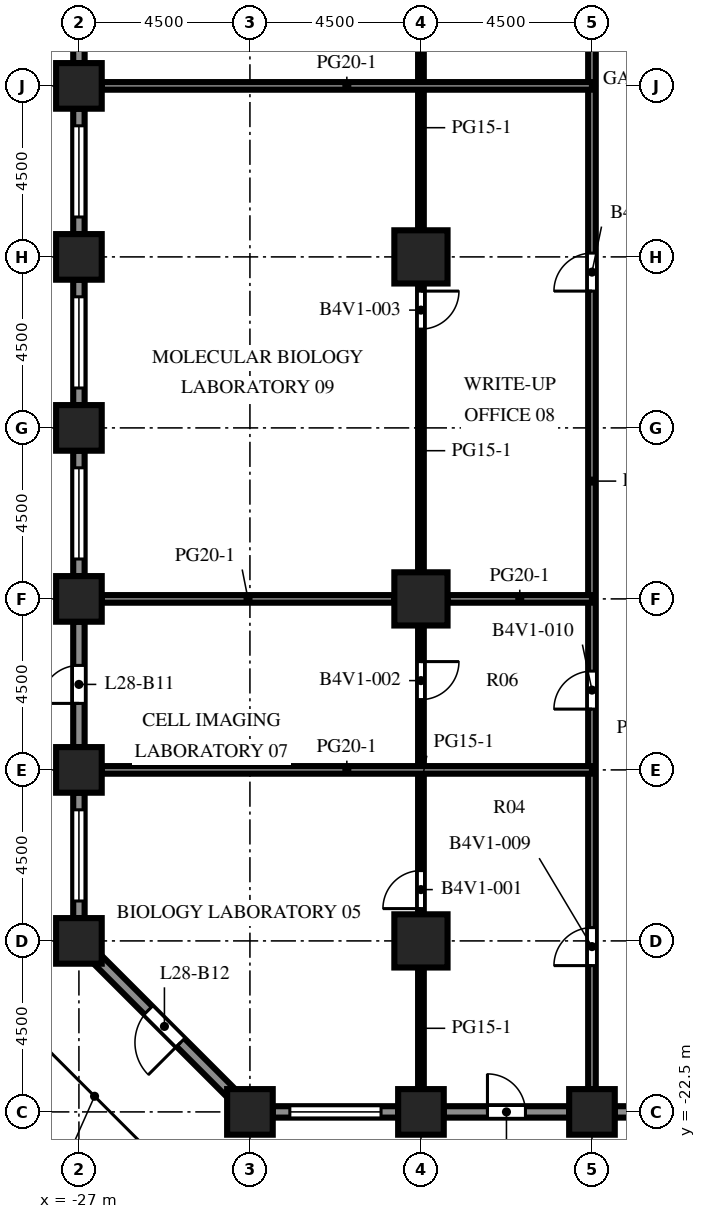
"""IFC4 building model, lengths in metres.
Left out: names, types, materials, properties, quantities, classifications, styles, units other than length and angle.
Written with IfcOpenShell. Run it as: python <this file> out.ifc"""

import sys

from ifc_helpers import new_model, si_unit, direction, frame, frame_2d, origin, origin_2d, place, context, subcontext, project, spatial, rectangle, extrude, element, fill, save


model = new_model("IFC4")
c1 = context("Model", 3, precision=1e-05, world=origin(), true_north=direction((0.0, 1.0)))
c2 = subcontext(c1, "Body", "Model", "MODEL_VIEW")
j1 = project(units=[si_unit("LENGTHUNIT", "METRE"), si_unit("PLANEANGLEUNIT", "RADIAN")], contexts=[c1])
p1 = place(None, origin())
s1 = spatial("IfcSite", under=j1, at=p1, CompositionType="ELEMENT")
p2 = place(p1, origin())
s2 = spatial("IfcBuilding", under=s1, at=p2, CompositionType="ELEMENT")
p3 = place(p2, frame((0.0, 0.0, 124.9)))
s3 = spatial("IfcBuildingStorey", under=s2, at=p3, CompositionType="ELEMENT", Elevation=124.9)
for number, where, z_axis, x_axis in (
    (1, (-27.0, -18.0, 0.0), (0.0, 0.0, 1.0), (1.0, 0.0, 0.0)),
    (2, (-27.0, -13.5, 0.0), (0.0, 0.0, 1.0), (1.0, 0.0, 0.0)),
    (3, (-27.0, -9.0, 0.0), (0.0, 0.0, 1.0), (1.0, 0.0, 0.0)),
    (4, (-27.0, -4.5, 0.0), (0.0, 0.0, 1.0), (1.0, 0.0, 0.0)),
    (5, (-27.0, 0.0, 0.0), (0.0, 0.0, 1.0), (1.0, 0.0, 0.0)),
    (6, (-27.0, 4.5, 0.0), (0.0, 0.0, 1.0), (1.0, 0.0, 0.0)),
    (7, (-22.5, -22.5, 0.0), (0.0, 0.0, 1.0), (1.0, 0.0, 0.0)),
    (8, (-18.0, -22.5, 0.0), (0.0, 0.0, 1.0), (1.0, 0.0, 0.0)),
    (9, (-13.5, -22.5, 0.0), (0.0, 0.0, 1.0), (1.0, 0.0, 0.0)),
):
    element("IfcColumn", number, at=place(p3, frame(where, z_axis=z_axis, x_axis=x_axis)), inside=s3, PredefinedType="COLUMN", context=c2, shape_type="SweptSolid", body=[
        extrude(rectangle(XDim=1.2, YDim=1.2, at=origin_2d()), origin(), (0.0, 0.0, 1.0), 4.1),
    ])
for number, where, z_axis, x_axis in (
    (10, (-18.0, -18.0, 0.0), (0.0, 0.0, 1.0), (1.0, 0.0, 0.0)),
    (11, (-18.0, -9.0, 0.0), (0.0, 0.0, 1.0), (1.0, 0.0, 0.0)),
    (12, (-18.0, 0.0, 0.0), (0.0, 0.0, 1.0), (1.0, 0.0, 0.0)),
):
    element("IfcColumn", number, at=place(p3, frame(where, z_axis=z_axis, x_axis=x_axis)), inside=s3, PredefinedType="COLUMN", context=c2, shape_type="SweptSolid", body=[
        extrude(rectangle(XDim=1.4, YDim=1.4, at=origin_2d()), origin(), (0.0, 0.0, 1.0), 4.1),
    ])
p4 = place(p3, frame((-18.6, -22.5, 0.0), z_axis=(0.0, 0.0, 1.0), x_axis=(-1.0, 0.0, 0.0)))
e13 = element("IfcWall", 13, at=p4, inside=s3, PredefinedType="SOLIDWALL", context=c2, shape_type="SweptSolid", body=[
    extrude(rectangle(XDim=3.3, YDim=0.3, at=frame_2d((1.65, 0.0))), origin(), (0.0, 0.0, 1.0), 2.75),
])
p5 = place(p4, frame((0.45, 0.0, 0.8)))
e14 = element("IfcOpeningElement", 14, at=p5, cuts=e13, PredefinedType="OPENING", context=c2, shape_type="SweptSolid", body=[
    extrude(rectangle(XDim=2.4, YDim=1.7, at=frame_2d((1.2, 0.85))), frame((0.0, 0.16, 0.0), z_axis=(0.0, -1.0, 0.0), x_axis=(1.0, 0.0, 0.0)), (0.0, 0.0, 1.0), 0.32),
])
p6 = place(p3, frame((-14.1, -22.5, 0.0), z_axis=(0.0, 0.0, 1.0), x_axis=(-1.0, 0.0, 0.0)))
e15 = element("IfcWall", 15, at=p6, inside=s3, PredefinedType="SOLIDWALL", context=c2, shape_type="SweptSolid", body=[
    extrude(rectangle(XDim=3.3, YDim=0.3, at=frame_2d((1.65, 0.0))), origin(), (0.0, 0.0, 1.0), 2.75),
])
p7 = place(p6, frame((1.15, 0.0, 0.0)))
e16 = element("IfcOpeningElement", 16, at=p7, cuts=e15, PredefinedType="OPENING", context=c2, shape_type="SweptSolid", body=[
    extrude(rectangle(XDim=1.0, YDim=2.2, at=frame_2d((0.5, 1.1))), frame((0.0, 0.16, 0.0), z_axis=(0.0, -1.0, 0.0), x_axis=(1.0, 0.0, 0.0)), (0.0, 0.0, 1.0), 0.32),
])
p8 = place(p3, frame((-9.6, -22.5, 0.0), z_axis=(0.0, 0.0, 1.0), x_axis=(-1.0, 0.0, 0.0)))
e17 = element("IfcWall", 17, at=p8, inside=s3, PredefinedType="SOLIDWALL", context=c2, shape_type="SweptSolid", body=[
    extrude(rectangle(XDim=3.3, YDim=0.3, at=frame_2d((1.65, 0.0))), origin(), (0.0, 0.0, 1.0), 2.75),
])
p9 = place(p8, frame((1.575, 0.0, 0.8)))
e18 = element("IfcOpeningElement", 18, at=p9, cuts=e17, PredefinedType="OPENING", context=c2, shape_type="SweptSolid", body=[
    extrude(rectangle(XDim=1.2, YDim=1.7, at=frame_2d((0.6, 0.85))), frame((0.0, 0.16, 0.0), z_axis=(0.0, -1.0, 0.0), x_axis=(1.0, 0.0, 0.0)), (0.0, 0.0, 1.0), 0.32),
])
p10 = place(p3, frame((-27.0, 5.1, 0.0), z_axis=(0.0, 0.0, 1.0), x_axis=(0.0, 1.0, 0.0)))
e19 = element("IfcWall", 19, at=p10, inside=s3, PredefinedType="SOLIDWALL", context=c2, shape_type="SweptSolid", body=[
    extrude(rectangle(XDim=3.3, YDim=0.3, at=frame_2d((1.65, 0.0))), origin(), (0.0, 0.0, 1.0), 2.75),
])
p11 = place(p10, frame((0.45, 0.0, 0.8)))
e20 = element("IfcOpeningElement", 20, at=p11, cuts=e19, PredefinedType="OPENING", context=c2, shape_type="SweptSolid", body=[
    extrude(rectangle(XDim=2.4, YDim=1.7, at=frame_2d((1.2, 0.85))), frame((0.0, 0.16, 0.0), z_axis=(0.0, -1.0, 0.0), x_axis=(1.0, 0.0, 0.0)), (0.0, 0.0, 1.0), 0.32),
])
p12 = place(p3, frame((-27.0, 0.6, 0.0), z_axis=(0.0, 0.0, 1.0), x_axis=(0.0, 1.0, 0.0)))
e21 = element("IfcWall", 21, at=p12, inside=s3, PredefinedType="SOLIDWALL", context=c2, shape_type="SweptSolid", body=[
    extrude(rectangle(XDim=3.3, YDim=0.3, at=frame_2d((1.65, 0.0))), origin(), (0.0, 0.0, 1.0), 2.75),
])
p13 = place(p12, frame((0.45, 0.0, 0.8)))
e22 = element("IfcOpeningElement", 22, at=p13, cuts=e21, PredefinedType="OPENING", context=c2, shape_type="SweptSolid", body=[
    extrude(rectangle(XDim=2.4, YDim=1.7, at=frame_2d((1.2, 0.85))), frame((0.0, 0.16, 0.0), z_axis=(0.0, -1.0, 0.0), x_axis=(1.0, 0.0, 0.0)), (0.0, 0.0, 1.0), 0.32),
])
p14 = place(p3, frame((-27.0, -3.9, 0.0), z_axis=(0.0, 0.0, 1.0), x_axis=(0.0, 1.0, 0.0)))
e23 = element("IfcWall", 23, at=p14, inside=s3, PredefinedType="SOLIDWALL", context=c2, shape_type="SweptSolid", body=[
    extrude(rectangle(XDim=3.3, YDim=0.3, at=frame_2d((1.65, 0.0))), origin(), (0.0, 0.0, 1.0), 2.75),
])
p15 = place(p14, frame((0.45, 0.0, 0.8)))
e24 = element("IfcOpeningElement", 24, at=p15, cuts=e23, PredefinedType="OPENING", context=c2, shape_type="SweptSolid", body=[
    extrude(rectangle(XDim=2.4, YDim=1.7, at=frame_2d((1.2, 0.85))), frame((0.0, 0.16, 0.0), z_axis=(0.0, -1.0, 0.0), x_axis=(1.0, 0.0, 0.0)), (0.0, 0.0, 1.0), 0.32),
])
p16 = place(p3, frame((-27.0, -8.4, 0.0), z_axis=(0.0, 0.0, 1.0), x_axis=(0.0, 1.0, 0.0)))
e25 = element("IfcWall", 25, at=p16, inside=s3, PredefinedType="SOLIDWALL", context=c2, shape_type="SweptSolid", body=[
    extrude(rectangle(XDim=3.3, YDim=0.3, at=frame_2d((1.65, 0.0))), origin(), (0.0, 0.0, 1.0), 2.75),
])
p17 = place(p16, frame((0.45, 0.0, 0.8)))
e26 = element("IfcOpeningElement", 26, at=p17, cuts=e25, PredefinedType="OPENING", context=c2, shape_type="SweptSolid", body=[
    extrude(rectangle(XDim=2.4, YDim=1.7, at=frame_2d((1.2, 0.85))), frame((0.0, 0.16, 0.0), z_axis=(0.0, -1.0, 0.0), x_axis=(1.0, 0.0, 0.0)), (0.0, 0.0, 1.0), 0.32),
])
p18 = place(p3, frame((-27.0, -12.9, 0.0), z_axis=(0.0, 0.0, 1.0), x_axis=(0.0, 1.0, 0.0)))
e27 = element("IfcWall", 27, at=p18, inside=s3, PredefinedType="SOLIDWALL", context=c2, shape_type="SweptSolid", body=[
    extrude(rectangle(XDim=3.3, YDim=0.3, at=frame_2d((1.65, 0.0))), origin(), (0.0, 0.0, 1.0), 2.75),
])
p19 = place(p18, frame((1.15, 0.0, 0.0)))
e28 = element("IfcOpeningElement", 28, at=p19, cuts=e27, PredefinedType="OPENING", context=c2, shape_type="SweptSolid", body=[
    extrude(rectangle(XDim=1.0, YDim=2.2, at=frame_2d((0.5, 1.1))), frame((0.0, 0.16, 0.0), z_axis=(0.0, -1.0, 0.0), x_axis=(1.0, 0.0, 0.0)), (0.0, 0.0, 1.0), 0.32),
])
p20 = place(p3, frame((-27.0, -17.4, 0.0), z_axis=(0.0, 0.0, 1.0), x_axis=(0.0, 1.0, 0.0)))
e29 = element("IfcWall", 29, at=p20, inside=s3, PredefinedType="SOLIDWALL", context=c2, shape_type="SweptSolid", body=[
    extrude(rectangle(XDim=3.3, YDim=0.3, at=frame_2d((1.65, 0.0))), origin(), (0.0, 0.0, 1.0), 2.75),
])
p21 = place(p20, frame((0.45, 0.0, 0.8)))
e30 = element("IfcOpeningElement", 30, at=p21, cuts=e29, PredefinedType="OPENING", context=c2, shape_type="SweptSolid", body=[
    extrude(rectangle(XDim=2.4, YDim=1.7, at=frame_2d((1.2, 0.85))), frame((0.0, 0.16, 0.0), z_axis=(0.0, -1.0, 0.0), x_axis=(1.0, 0.0, 0.0)), (0.0, 0.0, 1.0), 0.32),
])
p22 = place(p3, frame((-22.994, -22.006, 0.0), z_axis=(0.0, 0.0, 1.0), x_axis=(-0.707106781187, 0.707106781187, 0.0)))
e31 = element("IfcWall", 31, at=p22, inside=s3, PredefinedType="SOLIDWALL", context=c2, shape_type="SweptSolid", body=[
    extrude(rectangle(XDim=4.967, YDim=0.3, at=frame_2d((2.483, 0.0))), origin(), (0.0, 0.0, 1.0), 2.75),
])
p23 = place(p22, frame((1.884, 0.0, 0.0)))
e32 = element("IfcOpeningElement", 32, at=p23, cuts=e31, PredefinedType="OPENING", context=c2, shape_type="SweptSolid", body=[
    extrude(rectangle(XDim=1.2, YDim=2.2, at=frame_2d((0.6, 1.1))), frame((0.0, 0.16, 0.0), z_axis=(0.0, -1.0, 0.0), x_axis=(1.0, 0.0, 0.0)), (0.0, 0.0, 1.0), 0.32),
])
p24 = place(p3, frame((-18.0, -21.9, 0.0), z_axis=(0.0, 0.0, 1.0), x_axis=(0.0, 1.0, 0.0)))
e33 = element("IfcWall", 33, at=p24, inside=s3, PredefinedType="PARTITIONING", context=c2, shape_type="SweptSolid", body=[
    extrude(rectangle(XDim=3.2, YDim=0.15, at=frame_2d((1.6, 0.0))), origin(), (0.0, 0.0, 1.0), 3.65),
])
p25 = place(p3, frame((-18.0, -17.3, 0.0), z_axis=(0.0, 0.0, 1.0), x_axis=(0.0, 1.0, 0.0)))
e34 = element("IfcWall", 34, at=p25, inside=s3, PredefinedType="PARTITIONING", context=c2, shape_type="SweptSolid", body=[
    extrude(rectangle(XDim=7.6, YDim=0.15, at=frame_2d((3.8, 0.0))), origin(), (0.0, 0.0, 1.0), 3.65),
])
p26 = place(p25, frame((0.15, 0.0, 0.0)))
e35 = element("IfcOpeningElement", 35, at=p26, cuts=e34, PredefinedType="OPENING", context=c2, shape_type="SweptSolid", body=[
    extrude(rectangle(XDim=1.0, YDim=2.1, at=frame_2d((0.5, 1.05))), frame((0.0, 0.085, 0.0), z_axis=(0.0, -1.0, 0.0), x_axis=(1.0, 0.0, 0.0)), (0.0, 0.0, 1.0), 0.17),
])
p27 = place(p25, frame((5.65, 0.0, 0.0)))
e36 = element("IfcOpeningElement", 36, at=p27, cuts=e34, PredefinedType="OPENING", context=c2, shape_type="SweptSolid", body=[
    extrude(rectangle(XDim=1.0, YDim=2.1, at=frame_2d((0.5, 1.05))), frame((0.0, 0.085, 0.0), z_axis=(0.0, -1.0, 0.0), x_axis=(1.0, 0.0, 0.0)), (0.0, 0.0, 1.0), 0.17),
])
p28 = place(p3, frame((-18.0, -8.3, 0.0), z_axis=(0.0, 0.0, 1.0), x_axis=(0.0, 1.0, 0.0)))
e37 = element("IfcWall", 37, at=p28, inside=s3, PredefinedType="PARTITIONING", context=c2, shape_type="SweptSolid", body=[
    extrude(rectangle(XDim=7.6, YDim=0.15, at=frame_2d((3.8, 0.0))), origin(), (0.0, 0.0, 1.0), 3.65),
])
p29 = place(p28, frame((6.4, 0.0, 0.0)))
e38 = element("IfcOpeningElement", 38, at=p29, cuts=e37, PredefinedType="OPENING", context=c2, shape_type="SweptSolid", body=[
    extrude(rectangle(XDim=1.0, YDim=2.1, at=frame_2d((0.5, 1.05))), frame((0.0, 0.085, 0.0), z_axis=(0.0, -1.0, 0.0), x_axis=(1.0, 0.0, 0.0)), (0.0, 0.0, 1.0), 0.17),
])
p30 = place(p3, frame((-18.0, 0.7, 0.0), z_axis=(0.0, 0.0, 1.0), x_axis=(0.0, 1.0, 0.0)))
e39 = element("IfcWall", 39, at=p30, inside=s3, PredefinedType="PARTITIONING", context=c2, shape_type="SweptSolid", body=[
    extrude(rectangle(XDim=7.6, YDim=0.15, at=frame_2d((3.8, 0.0))), origin(), (0.0, 0.0, 1.0), 3.65),
])
p31 = place(p30, frame((5.4, 0.0, 0.0)))
e40 = element("IfcOpeningElement", 40, at=p31, cuts=e39, PredefinedType="OPENING", context=c2, shape_type="SweptSolid", body=[
    extrude(rectangle(XDim=1.0, YDim=2.1, at=frame_2d((0.5, 1.05))), frame((0.0, 0.085, 0.0), z_axis=(0.0, -1.0, 0.0), x_axis=(1.0, 0.0, 0.0)), (0.0, 0.0, 1.0), 0.17),
])
p32 = place(p3, frame((-13.5, -21.9, 0.0), z_axis=(0.0, 0.0, 1.0), x_axis=(0.0, 1.0, 0.0)))
e41 = element("IfcWall", 41, at=p32, inside=s3, PredefinedType="PARTITIONING", context=c2, shape_type="SweptSolid", body=[
    extrude(rectangle(XDim=52.8, YDim=0.2, at=frame_2d((26.4, 0.0))), origin(), (0.0, 0.0, 1.0), 3.65),
])
p33 = place(p32, frame((3.25, 0.0, 0.0)))
e42 = element("IfcOpeningElement", 42, at=p33, cuts=e41, PredefinedType="OPENING", context=c2, shape_type="SweptSolid", body=[
    extrude(rectangle(XDim=1.0, YDim=2.1, at=frame_2d((0.5, 1.05))), frame((0.0, 0.11, 0.0), z_axis=(0.0, -1.0, 0.0), x_axis=(1.0, 0.0, 0.0)), (0.0, 0.0, 1.0), 0.22),
])
p34 = place(p32, frame((10.0, 0.0, 0.0)))
e43 = element("IfcOpeningElement", 43, at=p34, cuts=e41, PredefinedType="OPENING", context=c2, shape_type="SweptSolid", body=[
    extrude(rectangle(XDim=1.0, YDim=2.1, at=frame_2d((0.5, 1.05))), frame((0.0, 0.11, 0.0), z_axis=(0.0, -1.0, 0.0), x_axis=(1.0, 0.0, 0.0)), (0.0, 0.0, 1.0), 0.22),
])
p35 = place(p32, frame((21.0, 0.0, 0.0)))
e44 = element("IfcOpeningElement", 44, at=p35, cuts=e41, PredefinedType="OPENING", context=c2, shape_type="SweptSolid", body=[
    extrude(rectangle(XDim=1.0, YDim=2.1, at=frame_2d((0.5, 1.05))), frame((0.0, 0.11, 0.0), z_axis=(0.0, -1.0, 0.0), x_axis=(1.0, 0.0, 0.0)), (0.0, 0.0, 1.0), 0.22),
])
p36 = place(p32, frame((27.75, 0.0, 0.0)))
e45 = element("IfcOpeningElement", 45, at=p36, cuts=e41, PredefinedType="OPENING", context=c2, shape_type="SweptSolid", body=[
    extrude(rectangle(XDim=1.0, YDim=2.1, at=frame_2d((0.5, 1.05))), frame((0.0, 0.11, 0.0), z_axis=(0.0, -1.0, 0.0), x_axis=(1.0, 0.0, 0.0)), (0.0, 0.0, 1.0), 0.22),
])
p37 = place(p32, frame((34.75, 0.0, 0.0)))
e46 = element("IfcOpeningElement", 46, at=p37, cuts=e41, PredefinedType="OPENING", context=c2, shape_type="SweptSolid", body=[
    extrude(rectangle(XDim=1.0, YDim=2.1, at=frame_2d((0.5, 1.05))), frame((0.0, 0.11, 0.0), z_axis=(0.0, -1.0, 0.0), x_axis=(1.0, 0.0, 0.0)), (0.0, 0.0, 1.0), 0.22),
])
p38 = place(p32, frame((42.0, 0.0, 0.0)))
e47 = element("IfcOpeningElement", 47, at=p38, cuts=e41, PredefinedType="OPENING", context=c2, shape_type="SweptSolid", body=[
    extrude(rectangle(XDim=1.0, YDim=2.1, at=frame_2d((0.5, 1.05))), frame((0.0, 0.11, 0.0), z_axis=(0.0, -1.0, 0.0), x_axis=(1.0, 0.0, 0.0)), (0.0, 0.0, 1.0), 0.22),
])
p39 = place(p32, frame((46.25, 0.0, 0.0)))
e48 = element("IfcOpeningElement", 48, at=p39, cuts=e41, PredefinedType="OPENING", context=c2, shape_type="SweptSolid", body=[
    extrude(rectangle(XDim=1.0, YDim=2.1, at=frame_2d((0.5, 1.05))), frame((0.0, 0.11, 0.0), z_axis=(0.0, -1.0, 0.0), x_axis=(1.0, 0.0, 0.0)), (0.0, 0.0, 1.0), 0.22),
])
p40 = place(p32, frame((51.0, 0.0, 0.0)))
e49 = element("IfcOpeningElement", 49, at=p40, cuts=e41, PredefinedType="OPENING", context=c2, shape_type="SweptSolid", body=[
    extrude(rectangle(XDim=1.0, YDim=2.1, at=frame_2d((0.5, 1.05))), frame((0.0, 0.11, 0.0), z_axis=(0.0, -1.0, 0.0), x_axis=(1.0, 0.0, 0.0)), (0.0, 0.0, 1.0), 0.22),
])
p41 = place(p3, frame((-26.4, -13.5, 0.0), z_axis=(0.0, 0.0, 1.0), x_axis=(1.0, 0.0, 0.0)))
e50 = element("IfcWall", 50, at=p41, inside=s3, PredefinedType="PARTITIONING", context=c2, shape_type="SweptSolid", body=[
    extrude(rectangle(XDim=12.9, YDim=0.2, at=frame_2d((6.45, 0.0))), origin(), (0.0, 0.0, 1.0), 3.65),
])
p42 = place(p3, frame((-26.4, -9.0, 0.0), z_axis=(0.0, 0.0, 1.0), x_axis=(1.0, 0.0, 0.0)))
e51 = element("IfcWall", 51, at=p42, inside=s3, PredefinedType="PARTITIONING", context=c2, shape_type="SweptSolid", body=[
    extrude(rectangle(XDim=7.7, YDim=0.2, at=frame_2d((3.85, 0.0))), origin(), (0.0, 0.0, 1.0), 3.65),
])
p43 = place(p3, frame((-17.3, -9.0, 0.0), z_axis=(0.0, 0.0, 1.0), x_axis=(1.0, 0.0, 0.0)))
e52 = element("IfcWall", 52, at=p43, inside=s3, PredefinedType="PARTITIONING", context=c2, shape_type="SweptSolid", body=[
    extrude(rectangle(XDim=3.8, YDim=0.2, at=frame_2d((1.9, 0.0))), origin(), (0.0, 0.0, 1.0), 3.65),
])
p44 = place(p3, frame((-26.4, 4.5, 0.0), z_axis=(0.0, 0.0, 1.0), x_axis=(1.0, 0.0, 0.0)))
e53 = element("IfcWall", 53, at=p44, inside=s3, PredefinedType="PARTITIONING", context=c2, shape_type="SweptSolid", body=[
    extrude(rectangle(XDim=12.9, YDim=0.2, at=frame_2d((6.45, 0.0))), origin(), (0.0, 0.0, 1.0), 3.65),
])
p45 = place(p5, origin())
e54 = element("IfcWindow", 54, at=p45, inside=s3, PartitioningType="SINGLE_PANEL", PredefinedType="WINDOW", context=c2, shape_type="SweptSolid", body=[
    extrude(rectangle(XDim=2.4, YDim=1.7, at=frame_2d((1.2, 0.85))), frame((0.0, 0.03, 0.0), z_axis=(0.0, -1.0, 0.0), x_axis=(1.0, 0.0, 0.0)), (0.0, 0.0, 1.0), 0.06),
])
fill(e14, e54)
p46 = place(p7, origin())
e55 = element("IfcDoor", 55, at=p46, inside=s3, OperationType="SINGLE_SWING_RIGHT", PredefinedType="DOOR", context=c2, shape_type="SweptSolid", body=[
    extrude(rectangle(XDim=1.0, YDim=2.2, at=frame_2d((0.5, 1.1))), frame((0.0, 0.025, 0.0), z_axis=(0.0, -1.0, 0.0), x_axis=(1.0, 0.0, 0.0)), (0.0, 0.0, 1.0), 0.05),
])
fill(e16, e55)
p47 = place(p13, origin())
e56 = element("IfcWindow", 56, at=p47, inside=s3, PartitioningType="SINGLE_PANEL", PredefinedType="WINDOW", context=c2, shape_type="SweptSolid", body=[
    extrude(rectangle(XDim=2.4, YDim=1.7, at=frame_2d((1.2, 0.85))), frame((0.0, 0.03, 0.0), z_axis=(0.0, -1.0, 0.0), x_axis=(1.0, 0.0, 0.0)), (0.0, 0.0, 1.0), 0.06),
])
fill(e22, e56)
p48 = place(p15, origin())
e57 = element("IfcWindow", 57, at=p48, inside=s3, PartitioningType="SINGLE_PANEL", PredefinedType="WINDOW", context=c2, shape_type="SweptSolid", body=[
    extrude(rectangle(XDim=2.4, YDim=1.7, at=frame_2d((1.2, 0.85))), frame((0.0, 0.03, 0.0), z_axis=(0.0, -1.0, 0.0), x_axis=(1.0, 0.0, 0.0)), (0.0, 0.0, 1.0), 0.06),
])
fill(e24, e57)
p49 = place(p17, origin())
e58 = element("IfcWindow", 58, at=p49, inside=s3, PartitioningType="SINGLE_PANEL", PredefinedType="WINDOW", context=c2, shape_type="SweptSolid", body=[
    extrude(rectangle(XDim=2.4, YDim=1.7, at=frame_2d((1.2, 0.85))), frame((0.0, 0.03, 0.0), z_axis=(0.0, -1.0, 0.0), x_axis=(1.0, 0.0, 0.0)), (0.0, 0.0, 1.0), 0.06),
])
fill(e26, e58)
p50 = place(p19, origin())
e59 = element("IfcDoor", 59, at=p50, inside=s3, OperationType="SINGLE_SWING_LEFT", PredefinedType="DOOR", context=c2, shape_type="SweptSolid", body=[
    extrude(rectangle(XDim=1.0, YDim=2.2, at=frame_2d((0.5, 1.1))), frame((0.0, 0.025, 0.0), z_axis=(0.0, -1.0, 0.0), x_axis=(1.0, 0.0, 0.0)), (0.0, 0.0, 1.0), 0.05),
])
fill(e28, e59)
p51 = place(p21, origin())
e60 = element("IfcWindow", 60, at=p51, inside=s3, PartitioningType="SINGLE_PANEL", PredefinedType="WINDOW", context=c2, shape_type="SweptSolid", body=[
    extrude(rectangle(XDim=2.4, YDim=1.7, at=frame_2d((1.2, 0.85))), frame((0.0, 0.03, 0.0), z_axis=(0.0, -1.0, 0.0), x_axis=(1.0, 0.0, 0.0)), (0.0, 0.0, 1.0), 0.06),
])
fill(e30, e60)
p52 = place(p23, origin())
e61 = element("IfcDoor", 61, at=p52, inside=s3, OperationType="SINGLE_SWING_LEFT", PredefinedType="DOOR", context=c2, shape_type="SweptSolid", body=[
    extrude(rectangle(XDim=1.2, YDim=2.2, at=frame_2d((0.6, 1.1))), frame((0.0, 0.025, 0.0), z_axis=(0.0, -1.0, 0.0), x_axis=(1.0, 0.0, 0.0)), (0.0, 0.0, 1.0), 0.05),
])
fill(e32, e61)
p53 = place(p26, origin())
e62 = element("IfcDoor", 62, at=p53, inside=s3, OperationType="SINGLE_SWING_LEFT", PredefinedType="DOOR", context=c2, shape_type="SweptSolid", body=[
    extrude(rectangle(XDim=1.0, YDim=2.1, at=frame_2d((0.5, 1.05))), frame((0.0, 0.025, 0.0), z_axis=(0.0, -1.0, 0.0), x_axis=(1.0, 0.0, 0.0)), (0.0, 0.0, 1.0), 0.05),
])
fill(e35, e62)
p54 = place(p27, origin())
e63 = element("IfcDoor", 63, at=p54, inside=s3, OperationType="SINGLE_SWING_RIGHT", PredefinedType="DOOR", context=c2, shape_type="SweptSolid", body=[
    extrude(rectangle(XDim=1.0, YDim=2.1, at=frame_2d((0.5, 1.05))), frame((0.0, 0.025, 0.0), z_axis=(0.0, -1.0, 0.0), x_axis=(1.0, 0.0, 0.0)), (0.0, 0.0, 1.0), 0.05),
])
fill(e36, e63)
p55 = place(p29, origin())
e64 = element("IfcDoor", 64, at=p55, inside=s3, OperationType="SINGLE_SWING_RIGHT", PredefinedType="DOOR", context=c2, shape_type="SweptSolid", body=[
    extrude(rectangle(XDim=1.0, YDim=2.1, at=frame_2d((0.5, 1.05))), frame((0.0, 0.025, 0.0), z_axis=(0.0, -1.0, 0.0), x_axis=(1.0, 0.0, 0.0)), (0.0, 0.0, 1.0), 0.05),
])
fill(e38, e64)
p56 = place(p33, origin())
e65 = element("IfcDoor", 65, at=p56, inside=s3, OperationType="SINGLE_SWING_LEFT", PredefinedType="DOOR", context=c2, shape_type="SweptSolid", body=[
    extrude(rectangle(XDim=1.0, YDim=2.1, at=frame_2d((0.5, 1.05))), frame((0.0, 0.025, 0.0), z_axis=(0.0, -1.0, 0.0), x_axis=(1.0, 0.0, 0.0)), (0.0, 0.0, 1.0), 0.05),
])
fill(e42, e65)
p57 = place(p34, origin())
e66 = element("IfcDoor", 66, at=p57, inside=s3, OperationType="SINGLE_SWING_LEFT", PredefinedType="DOOR", context=c2, shape_type="SweptSolid", body=[
    extrude(rectangle(XDim=1.0, YDim=2.1, at=frame_2d((0.5, 1.05))), frame((0.0, 0.025, 0.0), z_axis=(0.0, -1.0, 0.0), x_axis=(1.0, 0.0, 0.0)), (0.0, 0.0, 1.0), 0.05),
])
fill(e43, e66)
p58 = place(p35, origin())
e67 = element("IfcDoor", 67, at=p58, inside=s3, OperationType="SINGLE_SWING_LEFT", PredefinedType="DOOR", context=c2, shape_type="SweptSolid", body=[
    extrude(rectangle(XDim=1.0, YDim=2.1, at=frame_2d((0.5, 1.05))), frame((0.0, 0.025, 0.0), z_axis=(0.0, -1.0, 0.0), x_axis=(1.0, 0.0, 0.0)), (0.0, 0.0, 1.0), 0.05),
])
fill(e44, e67)
save(model, sys.argv[1])
